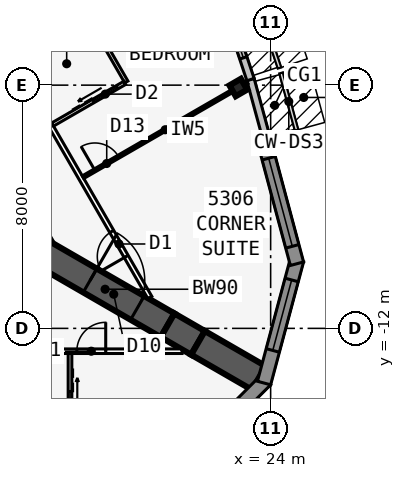
"""IFC4 building model, lengths in metres.
Left out: names, types, materials, properties, quantities, classifications, styles, units other than length and angle.
Written with IfcOpenShell. Run it as: python <this file> out.ifc"""

import sys

from ifc_helpers import new_model, si_unit, direction, frame, frame_2d, origin, origin_2d, place, context, subcontext, project, spatial, polyline, rectangle, i_section, outline, extrude, element, fill, save


model = new_model("IFC4")
c1 = context("Model", 3, precision=1e-05, world=origin(), true_north=direction((0.0, 1.0)))
c2 = subcontext(c1, "Body", "Model", "MODEL_VIEW")
j1 = project(units=[si_unit("LENGTHUNIT", "METRE"), si_unit("PLANEANGLEUNIT", "RADIAN")], contexts=[c1])
p1 = place(None, origin())
s1 = spatial("IfcSite", under=j1, at=p1, CompositionType="ELEMENT")
p2 = place(p1, origin())
s2 = spatial("IfcBuilding", under=s1, at=p2, CompositionType="ELEMENT")
p3 = place(p2, frame((0.0, 0.0, 200.9)))
s3 = spatial("IfcBuildingStorey", under=s2, at=p3, CompositionType="ELEMENT", Elevation=200.9)
p4 = place(p3, frame((16.5, -9.526, 0.0), z_axis=(0.0, 0.0, 1.0), x_axis=(-0.499999749417, 0.866025548458, 0.0)))
e1 = element("IfcWall", 1, at=p4, inside=s3, PredefinedType="SHEAR", context=c2, shape_type="SweptSolid", body=[
    extrude(rectangle(XDim=33.0, YDim=0.9, at=frame_2d((16.5, 0.0))), origin(), (0.0, 0.0, 1.0), 3.6),
])
p5 = place(p4, frame((14.15, 0.0, 0.0)))
e2 = element("IfcOpeningElement", 2, at=p5, cuts=e1, PredefinedType="OPENING", context=c2, shape_type="SweptSolid", body=[
    extrude(rectangle(XDim=1.8, YDim=2.13, at=frame_2d((0.9, 1.065))), frame((0.0, 0.46, 0.0), z_axis=(0.0, -1.0, 0.0), x_axis=(1.0, 0.0, 0.0)), (0.0, 0.0, 1.0), 0.92),
])
p6 = place(p4, frame((12.6, 0.0, 0.0)))
e3 = element("IfcOpeningElement", 3, at=p6, cuts=e1, PredefinedType="OPENING", context=c2, shape_type="SweptSolid", body=[
    extrude(rectangle(XDim=1.0, YDim=2.13, at=frame_2d((0.5, 1.065))), frame((0.0, 0.46, 0.0), z_axis=(0.0, -1.0, 0.0), x_axis=(1.0, 0.0, 0.0)), (0.0, 0.0, 1.0), 0.92),
])
p7 = place(p3, frame((16.5, -9.526, 0.0), z_axis=(0.0, 0.0, 1.0), x_axis=(0.866031398331, -0.499989616998, 0.0)))
e4 = element("IfcWall", 4, at=p7, inside=s3, PredefinedType="SHEAR", context=c2, shape_type="SweptSolid", body=[
    extrude(rectangle(XDim=4.746, YDim=0.9, at=frame_2d((2.373, 0.0))), origin(), (0.0, 0.0, 1.0), 3.6),
])
p8 = place(p7, frame((1.8, 0.0, 0.0)))
e5 = element("IfcOpeningElement", 5, at=p8, cuts=e4, PredefinedType="OPENING", context=c2, shape_type="SweptSolid", body=[
    extrude(rectangle(XDim=1.8, YDim=2.13, at=frame_2d((0.9, 1.065))), frame((0.0, 0.46, 0.0), z_axis=(0.0, -1.0, 0.0), x_axis=(1.0, 0.0, 0.0)), (0.0, 0.0, 1.0), 0.92),
])
p9 = place(p3, frame((20.61, -11.899, 0.0), z_axis=(0.0, 0.0, 1.0), x_axis=(0.866009537788, -0.500027479704, 0.0)))
e6 = element("IfcWall", 6, at=p9, inside=s3, PredefinedType="SHEAR", context=c2, shape_type="SweptSolid", body=[
    extrude(rectangle(XDim=1.155, YDim=0.9, at=frame_2d((0.577, 0.0))), origin(), (0.0, 0.0, 1.0), 3.6),
])
p10 = place(p3, frame((21.61, -12.477, 0.0), z_axis=(0.0, 0.0, 1.0), x_axis=(0.866055313784, -0.499948190782, 0.0)))
e7 = element("IfcWall", 7, at=p10, inside=s3, PredefinedType="SHEAR", context=c2, shape_type="SweptSolid", body=[
    extrude(rectangle(XDim=2.309, YDim=0.9, at=frame_2d((1.155, 0.0))), origin(), (0.0, 0.0, 1.0), 3.6),
])
p11 = place(p3, frame((22.937, -4.078, 0.0), z_axis=(0.0, 0.0, 1.0), x_axis=(-0.5, 0.866025403784, 0.0)))
e8 = element("IfcColumn", 8, at=p11, inside=s3, PredefinedType="COLUMN", context=c2, shape_type="SweptSolid", body=[
    extrude(i_section(OverallWidth=0.411, OverallDepth=0.434, WebThickness=0.036, FlangeThickness=0.057, at=origin_2d()), origin(), (0.0, 0.0, 1.0), 3.6),
])
p12 = place(p3, frame((20.882, -16.656, 0.0), z_axis=(0.0, 0.0, 1.0), x_axis=(0.707077605902, 0.707135955267, 0.0)))
e9 = element("IfcWall", 9, at=p12, inside=s3, PredefinedType="SOLIDWALL", context=c2, shape_type="SweptSolid", body=[
    extrude(outline(polyline([(4.184, 0.225), (4.125, 0.225), (3.633, 0.093), (3.598, 0.225), (0.0, 0.225), (0.0, -0.225), (4.184, -0.225), (4.184, 0.225)])), origin(), (0.0, 0.0, 1.0), 3.435),
])
p13 = place(p12, frame((0.674, 0.0, 0.45)))
e10 = element("IfcOpeningElement", 10, at=p13, cuts=e9, PredefinedType="OPENING", context=c2, shape_type="SweptSolid", body=[
    extrude(rectangle(XDim=2.4, YDim=2.6, at=frame_2d((1.2, 1.3))), frame((0.0, 0.235, 0.0), z_axis=(0.0, -1.0, 0.0), x_axis=(1.0, 0.0, 0.0)), (0.0, 0.0, 1.0), 0.47),
])
p14 = place(p3, frame((23.783, -13.798, 0.0), z_axis=(0.0, 0.0, 1.0), x_axis=(0.258799282522, 0.96593112144, 0.0)))
e11 = element("IfcWall", 11, at=p14, inside=s3, PredefinedType="SOLIDWALL", context=c2, shape_type="SweptSolid", body=[
    extrude(outline(polyline([(4.184, 0.225), (0.586, 0.225), (0.551, 0.093), (0.059, 0.225), (0.0, 0.225), (0.0, -0.225), (4.184, -0.225), (4.184, 0.225)])), origin(), (0.0, 0.0, 1.0), 3.435),
])
p15 = place(p14, frame((1.11, 0.0, 0.45)))
e12 = element("IfcOpeningElement", 12, at=p15, cuts=e11, PredefinedType="OPENING", context=c2, shape_type="SweptSolid", body=[
    extrude(rectangle(XDim=2.4, YDim=2.6, at=frame_2d((1.2, 1.3))), frame((0.0, 0.235, 0.0), z_axis=(0.0, -1.0, 0.0), x_axis=(1.0, 0.0, 0.0)), (0.0, 0.0, 1.0), 0.47),
])
p16 = place(p3, frame((24.865, -9.873, 0.0), z_axis=(0.0, 0.0, 1.0), x_axis=(-0.258784695888, 0.965935029479, 0.0)))
e13 = element("IfcWall", 13, at=p16, inside=s3, PredefinedType="SOLIDWALL", context=c2, shape_type="SweptSolid", body=[
    extrude(rectangle(XDim=4.184, YDim=0.45, at=frame_2d((2.092, 0.0))), origin(), (0.0, 0.0, 1.0), 3.435),
])
p17 = place(p16, frame((0.592, 0.0, 0.45)))
e14 = element("IfcOpeningElement", 14, at=p17, cuts=e13, PredefinedType="OPENING", context=c2, shape_type="SweptSolid", body=[
    extrude(rectangle(XDim=3.0, YDim=2.6, at=frame_2d((1.5, 1.3))), frame((0.0, 0.235, 0.0), z_axis=(0.0, -1.0, 0.0), x_axis=(1.0, 0.0, 0.0)), (0.0, 0.0, 1.0), 0.47),
])
p18 = place(p3, frame((23.879, -5.806, 0.0), z_axis=(0.0, 0.0, 1.0), x_axis=(-0.262867703986, 0.964831887015, 0.0)))
e15 = element("IfcWall", 15, at=p18, inside=s3, PredefinedType="STANDARD", context=c2, shape_type="SweptSolid", body=[
    extrude(rectangle(XDim=2.068, YDim=0.25, at=frame_2d((1.034, 0.0))), origin(), (0.0, 0.0, 1.0), 3.435),
])
p19 = place(p3, frame((23.338, -3.817, 0.0), z_axis=(0.0, 0.0, 1.0), x_axis=(-0.315108478109, 0.949055660656, 0.0)))
e16 = element("IfcWall", 16, at=p19, inside=s3, PredefinedType="STANDARD", context=c2, shape_type="SweptSolid", body=[
    extrude(rectangle(XDim=5.105, YDim=0.25, at=frame_2d((2.552, 0.0))), origin(), (0.0, 0.0, 1.0), 3.435),
])
p20 = place(p19, frame((0.752, 0.0, 0.45)))
e17 = element("IfcOpeningElement", 17, at=p20, cuts=e16, PredefinedType="OPENING", context=c2, shape_type="SweptSolid", body=[
    extrude(rectangle(XDim=3.6, YDim=2.6, at=frame_2d((1.8, 1.3))), frame((0.0, 0.135, 0.0), z_axis=(0.0, -1.0, 0.0), x_axis=(1.0, 0.0, 0.0)), (0.0, 0.0, 1.0), 0.27),
])
p21 = place(p3, frame((-21.086, -12.751, 0.0), z_axis=(0.0, 0.0, 1.0), x_axis=(1.0, 0.0, 0.0)))
e18 = element("IfcWall", 18, at=p21, inside=s3, PredefinedType="PARTITIONING", context=c2, shape_type="SweptSolid", body=[
    extrude(rectangle(XDim=42.172, YDim=0.15, at=frame_2d((21.086, 0.0))), origin(), (0.0, 0.0, 1.0), 3.435),
])
p22 = place(p21, frame((2.511, 0.0, 0.0)))
e19 = element("IfcOpeningElement", 19, at=p22, cuts=e18, PredefinedType="OPENING", context=c2, shape_type="SweptSolid", body=[
    extrude(rectangle(XDim=0.95, YDim=2.13, at=frame_2d((0.475, 1.065))), frame((0.0, 0.085, 0.0), z_axis=(0.0, -1.0, 0.0), x_axis=(1.0, 0.0, 0.0)), (0.0, 0.0, 1.0), 0.17),
])
p23 = place(p21, frame((8.111, 0.0, 0.0)))
e20 = element("IfcOpeningElement", 20, at=p23, cuts=e18, PredefinedType="OPENING", context=c2, shape_type="SweptSolid", body=[
    extrude(rectangle(XDim=0.95, YDim=2.13, at=frame_2d((0.475, 1.065))), frame((0.0, 0.085, 0.0), z_axis=(0.0, -1.0, 0.0), x_axis=(1.0, 0.0, 0.0)), (0.0, 0.0, 1.0), 0.17),
])
p24 = place(p21, frame((18.711, 0.0, 0.0)))
e21 = element("IfcOpeningElement", 21, at=p24, cuts=e18, PredefinedType="OPENING", context=c2, shape_type="SweptSolid", body=[
    extrude(rectangle(XDim=0.95, YDim=2.13, at=frame_2d((0.475, 1.065))), frame((0.0, 0.085, 0.0), z_axis=(0.0, -1.0, 0.0), x_axis=(1.0, 0.0, 0.0)), (0.0, 0.0, 1.0), 0.17),
])
p25 = place(p21, frame((23.086, 0.0, 0.0)))
e22 = element("IfcOpeningElement", 22, at=p25, cuts=e18, PredefinedType="OPENING", context=c2, shape_type="SweptSolid", body=[
    extrude(rectangle(XDim=1.0, YDim=2.13, at=frame_2d((0.5, 1.065))), frame((0.0, 0.085, 0.0), z_axis=(0.0, -1.0, 0.0), x_axis=(1.0, 0.0, 0.0)), (0.0, 0.0, 1.0), 0.17),
])
p26 = place(p21, frame((29.311, 0.0, 0.0)))
e23 = element("IfcOpeningElement", 23, at=p26, cuts=e18, PredefinedType="OPENING", context=c2, shape_type="SweptSolid", body=[
    extrude(rectangle(XDim=0.95, YDim=2.13, at=frame_2d((0.475, 1.065))), frame((0.0, 0.085, 0.0), z_axis=(0.0, -1.0, 0.0), x_axis=(1.0, 0.0, 0.0)), (0.0, 0.0, 1.0), 0.17),
])
p27 = place(p21, frame((38.711, 0.0, 0.0)))
e24 = element("IfcOpeningElement", 24, at=p27, cuts=e18, PredefinedType="OPENING", context=c2, shape_type="SweptSolid", body=[
    extrude(rectangle(XDim=0.95, YDim=2.13, at=frame_2d((0.475, 1.065))), frame((0.0, 0.085, 0.0), z_axis=(0.0, -1.0, 0.0), x_axis=(1.0, 0.0, 0.0)), (0.0, 0.0, 1.0), 0.17),
])
p28 = place(p3, frame((17.4, -12.826, 0.0), z_axis=(0.0, 0.0, 1.0), x_axis=(0.0, -1.0, 0.0)))
e25 = element("IfcWall", 25, at=p28, inside=s3, PredefinedType="PLUMBINGWALL", context=c2, shape_type="SweptSolid", body=[
    extrude(rectangle(XDim=2.44, YDim=0.12, at=frame_2d((1.22, 0.0))), origin(), (0.0, 0.0, 1.0), 3.435),
])
p29 = place(p28, frame((1.25, 0.0, 0.0)))
e26 = element("IfcOpeningElement", 26, at=p29, cuts=e25, PredefinedType="OPENING", context=c2, shape_type="SweptSolid", body=[
    extrude(rectangle(XDim=0.9, YDim=2.13, at=frame_2d((0.45, 1.065))), frame((0.0, 0.07, 0.0), z_axis=(0.0, -1.0, 0.0), x_axis=(1.0, 0.0, 0.0)), (0.0, 0.0, 1.0), 0.14),
])
p30 = place(p3, frame((20.027, -10.985, 0.0), z_axis=(0.0, 0.0, 1.0), x_axis=(-0.500001677587, 0.866024435227, 0.0)))
e27 = element("IfcWall", 27, at=p30, inside=s3, PredefinedType="PARTITIONING", context=c2, shape_type="SweptSolid", body=[
    extrude(rectangle(XDim=39.054, YDim=0.15, at=frame_2d((19.527, 0.0))), origin(), (0.0, 0.0, 1.0), 3.435),
])
p31 = place(p30, frame((1.558, 0.0, 0.0)))
e28 = element("IfcOpeningElement", 28, at=p31, cuts=e27, PredefinedType="OPENING", context=c2, shape_type="SweptSolid", body=[
    extrude(rectangle(XDim=0.95, YDim=2.13, at=frame_2d((0.475, 1.065))), frame((0.0, 0.085, 0.0), z_axis=(0.0, -1.0, 0.0), x_axis=(1.0, 0.0, 0.0)), (0.0, 0.0, 1.0), 0.17),
])
p32 = place(p30, frame((12.752, 0.0, 0.0)))
e29 = element("IfcOpeningElement", 29, at=p32, cuts=e27, PredefinedType="OPENING", context=c2, shape_type="SweptSolid", body=[
    extrude(rectangle(XDim=0.95, YDim=2.13, at=frame_2d((0.475, 1.065))), frame((0.0, 0.085, 0.0), z_axis=(0.0, -1.0, 0.0), x_axis=(1.0, 0.0, 0.0)), (0.0, 0.0, 1.0), 0.17),
])
p33 = place(p30, frame((17.152, 0.0, 0.0)))
e30 = element("IfcOpeningElement", 30, at=p33, cuts=e27, PredefinedType="OPENING", context=c2, shape_type="SweptSolid", body=[
    extrude(rectangle(XDim=0.95, YDim=2.13, at=frame_2d((0.475, 1.065))), frame((0.0, 0.085, 0.0), z_axis=(0.0, -1.0, 0.0), x_axis=(1.0, 0.0, 0.0)), (0.0, 0.0, 1.0), 0.17),
])
p34 = place(p30, frame((22.752, 0.0, 0.0)))
e31 = element("IfcOpeningElement", 31, at=p34, cuts=e27, PredefinedType="OPENING", context=c2, shape_type="SweptSolid", body=[
    extrude(rectangle(XDim=0.95, YDim=2.13, at=frame_2d((0.475, 1.065))), frame((0.0, 0.085, 0.0), z_axis=(0.0, -1.0, 0.0), x_axis=(1.0, 0.0, 0.0)), (0.0, 0.0, 1.0), 0.17),
])
p35 = place(p30, frame((32.152, 0.0, 0.0)))
e32 = element("IfcOpeningElement", 32, at=p35, cuts=e27, PredefinedType="OPENING", context=c2, shape_type="SweptSolid", body=[
    extrude(rectangle(XDim=0.95, YDim=2.13, at=frame_2d((0.475, 1.065))), frame((0.0, 0.085, 0.0), z_axis=(0.0, -1.0, 0.0), x_axis=(1.0, 0.0, 0.0)), (0.0, 0.0, 1.0), 0.17),
])
p36 = place(p30, frame((37.152, 0.0, 0.0)))
e33 = element("IfcOpeningElement", 33, at=p36, cuts=e27, PredefinedType="OPENING", context=c2, shape_type="SweptSolid", body=[
    extrude(rectangle(XDim=0.95, YDim=2.13, at=frame_2d((0.475, 1.065))), frame((0.0, 0.085, 0.0), z_axis=(0.0, -1.0, 0.0), x_axis=(1.0, 0.0, 0.0)), (0.0, 0.0, 1.0), 0.17),
])
p37 = place(p3, frame((17.829, -7.027, 0.0), z_axis=(0.0, 0.0, 1.0), x_axis=(0.866026604282, 0.499997920671, 0.0)))
e34 = element("IfcWall", 34, at=p37, inside=s3, PredefinedType="PARTITIONING", context=c2, shape_type="SweptSolid", body=[
    extrude(rectangle(XDim=6.24, YDim=0.1, at=frame_2d((3.12, 0.0))), origin(), (0.0, 0.0, 1.0), 2.589),
])
p38 = place(p37, frame((0.45, 0.0, 0.0)))
e35 = element("IfcOpeningElement", 35, at=p38, cuts=e34, PredefinedType="OPENING", context=c2, shape_type="SweptSolid", body=[
    extrude(rectangle(XDim=0.9, YDim=2.13, at=frame_2d((0.45, 1.065))), frame((0.0, 0.06, 0.0), z_axis=(0.0, -1.0, 0.0), x_axis=(1.0, 0.0, 0.0)), (0.0, 0.0, 1.0), 0.12),
])
p39 = place(p3, frame((19.253, -3.895, 0.0), z_axis=(0.0, 0.0, 1.0), x_axis=(-0.499990139034, 0.866031096941, 0.0)))
e36 = element("IfcWall", 36, at=p39, inside=s3, PredefinedType="PLUMBINGWALL", context=c2, shape_type="SweptSolid", body=[
    extrude(rectangle(XDim=3.0, YDim=0.12, at=frame_2d((1.5, 0.0))), origin(), (0.0, 0.0, 1.0), 3.435),
])
p40 = place(p3, frame((16.829, -5.295, 0.0), z_axis=(0.0, 0.0, 1.0), x_axis=(0.866035715982, 0.499982138324, 0.0)))
e37 = element("IfcWall", 37, at=p40, inside=s3, PredefinedType="PLUMBINGWALL", context=c2, shape_type="SweptSolid", body=[
    extrude(rectangle(XDim=2.74, YDim=0.12, at=frame_2d((1.37, 0.0))), origin(), (0.0, 0.0, 1.0), 3.435),
])
p41 = place(p40, frame((1.55, 0.0, 0.0)))
e38 = element("IfcOpeningElement", 38, at=p41, cuts=e37, PredefinedType="OPENING", context=c2, shape_type="SweptSolid", body=[
    extrude(rectangle(XDim=0.9, YDim=2.13, at=frame_2d((0.45, 1.065))), frame((0.0, 0.07, 0.0), z_axis=(0.0, -1.0, 0.0), x_axis=(1.0, 0.0, 0.0)), (0.0, 0.0, 1.0), 0.14),
])
p42 = place(p15, origin())
e39 = element("IfcWindow", 39, at=p42, inside=s3, PartitioningType="SINGLE_PANEL", PredefinedType="WINDOW", context=c2, shape_type="SweptSolid", body=[
    extrude(rectangle(XDim=2.4, YDim=2.6, at=frame_2d((1.2, 1.3))), frame((0.0, 0.03, 0.0), z_axis=(0.0, -1.0, 0.0), x_axis=(1.0, 0.0, 0.0)), (0.0, 0.0, 1.0), 0.06),
])
fill(e12, e39)
p43 = place(p17, origin())
e40 = element("IfcWindow", 40, at=p43, inside=s3, PartitioningType="SINGLE_PANEL", PredefinedType="WINDOW", context=c2, shape_type="SweptSolid", body=[
    extrude(rectangle(XDim=3.0, YDim=2.6, at=frame_2d((1.5, 1.3))), frame((0.0, 0.03, 0.0), z_axis=(0.0, -1.0, 0.0), x_axis=(1.0, 0.0, 0.0)), (0.0, 0.0, 1.0), 0.06),
])
fill(e14, e40)
p44 = place(p20, origin())
e41 = element("IfcWindow", 41, at=p44, inside=s3, PartitioningType="SINGLE_PANEL", PredefinedType="WINDOW", context=c2, shape_type="SweptSolid", body=[
    extrude(rectangle(XDim=3.6, YDim=2.6, at=frame_2d((1.8, 1.3))), frame((0.0, 0.03, 0.0), z_axis=(0.0, -1.0, 0.0), x_axis=(1.0, 0.0, 0.0)), (0.0, 0.0, 1.0), 0.06),
])
fill(e17, e41)
p45 = place(p29, origin())
e42 = element("IfcDoor", 42, at=p45, inside=s3, OperationType="SLIDING_TO_LEFT", PredefinedType="DOOR", context=c2, shape_type="SweptSolid", body=[
    extrude(rectangle(XDim=0.9, YDim=2.13, at=frame_2d((0.45, 1.065))), frame((0.0, 0.025, 0.0), z_axis=(0.0, -1.0, 0.0), x_axis=(1.0, 0.0, 0.0)), (0.0, 0.0, 1.0), 0.05),
])
fill(e26, e42)
p46 = place(p27, origin())
e43 = element("IfcDoor", 43, at=p46, inside=s3, OperationType="SINGLE_SWING_RIGHT", PredefinedType="DOOR", context=c2, shape_type="SweptSolid", body=[
    extrude(rectangle(XDim=0.95, YDim=2.13, at=frame_2d((0.475, 1.065))), frame((0.0, 0.025, 0.0), z_axis=(0.0, -1.0, 0.0), x_axis=(1.0, 0.0, 0.0)), (0.0, 0.0, 1.0), 0.05),
])
fill(e24, e43)
p47 = place(p38, origin())
e44 = element("IfcDoor", 44, at=p47, inside=s3, OperationType="SINGLE_SWING_LEFT", PredefinedType="DOOR", context=c2, shape_type="SweptSolid", body=[
    extrude(rectangle(XDim=0.9, YDim=2.13, at=frame_2d((0.45, 1.065))), frame((0.0, 0.025, 0.0), z_axis=(0.0, -1.0, 0.0), x_axis=(1.0, 0.0, 0.0)), (0.0, 0.0, 1.0), 0.05),
])
fill(e35, e44)
p48 = place(p31, origin())
e45 = element("IfcDoor", 45, at=p48, inside=s3, OperationType="SINGLE_SWING_LEFT", PredefinedType="DOOR", context=c2, shape_type="SweptSolid", body=[
    extrude(rectangle(XDim=0.95, YDim=2.13, at=frame_2d((0.475, 1.065))), frame((0.0, 0.025, 0.0), z_axis=(0.0, -1.0, 0.0), x_axis=(1.0, 0.0, 0.0)), (0.0, 0.0, 1.0), 0.05),
])
fill(e28, e45)
p49 = place(p41, origin())
e46 = element("IfcDoor", 46, at=p49, inside=s3, OperationType="SLIDING_TO_LEFT", PredefinedType="DOOR", context=c2, shape_type="SweptSolid", body=[
    extrude(rectangle(XDim=0.9, YDim=2.13, at=frame_2d((0.45, 1.065))), frame((0.0, 0.025, 0.0), z_axis=(0.0, -1.0, 0.0), x_axis=(1.0, 0.0, 0.0)), (0.0, 0.0, 1.0), 0.05),
])
fill(e38, e46)
p50 = place(p8, origin())
e47 = element("IfcDoor", 47, at=p50, inside=s3, OperationType="DOUBLE_DOOR_DOUBLE_SWING", PredefinedType="DOOR", context=c2, shape_type="SweptSolid", body=[
    extrude(rectangle(XDim=1.8, YDim=2.13, at=frame_2d((0.9, 1.065))), frame((0.0, 0.025, 0.0), z_axis=(0.0, -1.0, 0.0), x_axis=(1.0, 0.0, 0.0)), (0.0, 0.0, 1.0), 0.05),
])
fill(e5, e47)
save(model, sys.argv[1])
